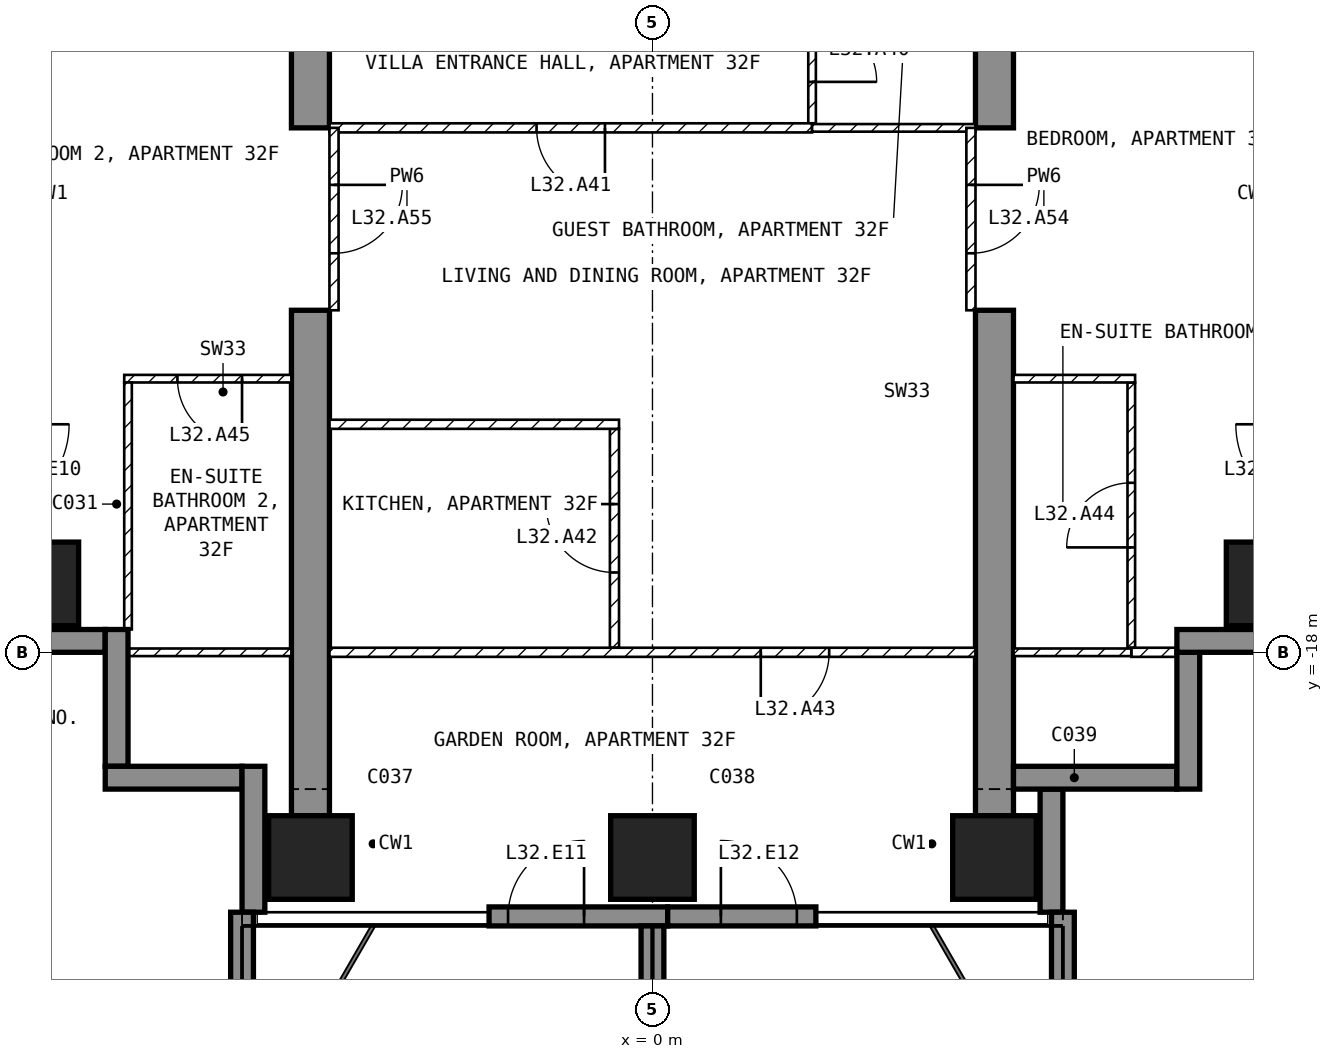
"""IFC4 building model, lengths in metres.
Left out: names, types, materials, properties, quantities, classifications, styles, units other than length and angle.
Written with IfcOpenShell. Run it as: python <this file> out.ifc"""

import sys

from ifc_helpers import new_model, si_unit, direction, frame, frame_2d, origin, origin_2d, place, context, subcontext, project, spatial, polyline, rectangle, outline, extrude, element, fill, save


model = new_model("IFC4")
c1 = context("Model", 3, precision=1e-05, world=origin(), true_north=direction((0.0, 1.0)))
c2 = subcontext(c1, "Body", "Model", "MODEL_VIEW")
j1 = project(units=[si_unit("LENGTHUNIT", "METRE"), si_unit("PLANEANGLEUNIT", "RADIAN")], contexts=[c1])
p1 = place(None, origin())
s1 = spatial("IfcSite", under=j1, at=p1, CompositionType="ELEMENT")
p2 = place(p1, origin())
s2 = spatial("IfcBuilding", under=s1, at=p2, CompositionType="ELEMENT")
p3 = place(p2, frame((0.0, 0.0, 133.9)))
s3 = spatial("IfcBuildingStorey", under=s2, at=p3, CompositionType="ELEMENT", Elevation=133.9)
for number, where, z_axis, x_axis in (
    (1, (-8.1, -17.1, -0.25), (0.0, 0.0, 1.0), (1.0, 0.0, 0.0)),
    (2, (-4.5, -20.7, -0.25), (0.0, 0.0, 1.0), (1.0, 0.0, 0.0)),
    (3, (0.0, -20.7, -0.25), (0.0, 0.0, 1.0), (1.0, 0.0, 0.0)),
    (4, (4.5, -20.7, -0.25), (0.0, 0.0, 1.0), (1.0, 0.0, 0.0)),
    (5, (8.1, -17.1, -0.25), (0.0, 0.0, 1.0), (1.0, 0.0, 0.0)),
):
    element("IfcColumn", number, at=place(p3, frame(where, z_axis=z_axis, x_axis=x_axis)), inside=s3, PredefinedType="COLUMN", context=c2, shape_type="SweptSolid", body=[
        extrude(rectangle(XDim=1.1, YDim=1.1, at=origin_2d()), origin(), (0.0, 0.0, 1.0), 3.5),
    ])
for number, where, z_axis, x_axis in (
    (6, (-4.75, -20.15, -0.25), (1.0, 0.0, 0.0), (0.0, 1.0, 0.0)),
    (7, (4.25, -20.15, -0.25), (1.0, 0.0, 0.0), (0.0, 1.0, 0.0)),
):
    element("IfcWall", number, at=place(p3, frame(where, z_axis=z_axis, x_axis=x_axis)), inside=s3, PredefinedType="SHEAR", context=c2, shape_type="SweptSolid", body=[
        extrude(outline(polyline([(0.0, 0.0), (6.65, 0.0), (6.65, 2.65), (9.05, 2.65), (9.05, 0.0), (11.15, 0.0), (11.15, 3.5), (0.0, 3.5), (0.0, 0.0)])), origin(), (0.0, 0.0, 1.0), 0.5),
    ])
p4 = place(p3, frame((-2.15, -21.475, 0.0), z_axis=(0.0, 0.0, 1.0), x_axis=(1.0, 0.0, 0.0)))
e8 = element("IfcWall", 8, at=p4, inside=s3, PredefinedType="SOLIDWALL", context=c2, shape_type="SweptSolid", body=[
    extrude(rectangle(XDim=2.35, YDim=0.25, at=frame_2d((1.175, 0.0))), origin(), (0.0, 0.0, 1.0), 3.25),
])
p5 = place(p4, frame((0.25, 0.0, 0.0)))
e9 = element("IfcOpeningElement", 9, at=p5, cuts=e8, PredefinedType="OPENING", context=c2, shape_type="SweptSolid", body=[
    extrude(rectangle(XDim=1.0, YDim=2.4, at=frame_2d((0.5, 1.2))), frame((0.0, 0.135, 0.0), z_axis=(0.0, -1.0, 0.0), x_axis=(1.0, 0.0, 0.0)), (0.0, 0.0, 1.0), 0.27),
])
p6 = place(p3, frame((0.2, -21.475, 0.0), z_axis=(0.0, 0.0, 1.0), x_axis=(1.0, 0.0, 0.0)))
e10 = element("IfcWall", 10, at=p6, inside=s3, PredefinedType="SOLIDWALL", context=c2, shape_type="SweptSolid", body=[
    extrude(rectangle(XDim=1.95, YDim=0.25, at=frame_2d((0.975, 0.0))), origin(), (0.0, 0.0, 1.0), 3.25),
])
p7 = place(p6, frame((0.7, 0.0, 0.0)))
e11 = element("IfcOpeningElement", 11, at=p7, cuts=e10, PredefinedType="OPENING", context=c2, shape_type="SweptSolid", body=[
    extrude(rectangle(XDim=1.0, YDim=2.4, at=frame_2d((0.5, 1.2))), frame((0.0, 0.135, 0.0), z_axis=(0.0, -1.0, 0.0), x_axis=(1.0, 0.0, 0.0)), (0.0, 0.0, 1.0), 0.27),
])
p8 = place(p3, frame((5.25, -21.42, 0.0), z_axis=(0.0, 0.0, 1.0), x_axis=(0.0, 1.0, 0.0)))
e12 = element("IfcWall", 12, at=p8, inside=s3, PredefinedType="SOLIDWALL", context=c2, shape_type="SweptSolid", body=[
    extrude(rectangle(XDim=1.62, YDim=0.3, at=frame_2d((0.81, 0.0))), origin(), (0.0, 0.0, 1.0), 3.25),
])
p9 = place(p3, frame((4.75, -19.65, 0.0), z_axis=(0.0, 0.0, 1.0), x_axis=(1.0, 0.0, 0.0)))
e13 = element("IfcWall", 13, at=p9, inside=s3, PredefinedType="SOLIDWALL", context=c2, shape_type="SweptSolid", body=[
    extrude(rectangle(XDim=2.15, YDim=0.3, at=frame_2d((1.075, 0.0))), origin(), (0.0, 0.0, 1.0), 3.25),
])
p10 = place(p3, frame((7.05, -19.8, 0.0), z_axis=(0.0, 0.0, 1.0), x_axis=(0.0, 1.0, 0.0)))
e14 = element("IfcWall", 14, at=p10, inside=s3, PredefinedType="SOLIDWALL", context=c2, shape_type="SweptSolid", body=[
    extrude(rectangle(XDim=1.8, YDim=0.3, at=frame_2d((0.9, 0.0))), origin(), (0.0, 0.0, 1.0), 3.25),
])
p11 = place(p3, frame((6.9, -17.85, 0.0), z_axis=(0.0, 0.0, 1.0), x_axis=(1.0, 0.0, 0.0)))
e15 = element("IfcWall", 15, at=p11, inside=s3, PredefinedType="SOLIDWALL", context=c2, shape_type="SweptSolid", body=[
    extrude(rectangle(XDim=1.85, YDim=0.3, at=frame_2d((0.925, 0.0))), origin(), (0.0, 0.0, 1.0), 3.25),
])
p12 = place(p3, frame((-8.75, -17.85, 0.0), z_axis=(0.0, 0.0, 1.0), x_axis=(1.0, 0.0, 0.0)))
e16 = element("IfcWall", 16, at=p12, inside=s3, PredefinedType="SOLIDWALL", context=c2, shape_type="SweptSolid", body=[
    extrude(rectangle(XDim=1.55, YDim=0.3, at=frame_2d((0.775, 0.0))), origin(), (0.0, 0.0, 1.0), 3.25),
])
for number, where, z_axis, x_axis in (
    (17, (-7.05, -17.7, 0.0), (0.0, 0.0, 1.0), (0.0, -1.0, 0.0)),
    (18, (-7.2, -19.65, 0.0), (0.0, 0.0, 1.0), (1.0, 0.0, 0.0)),
):
    element("IfcWall", number, at=place(p3, frame(where, z_axis=z_axis, x_axis=x_axis)), inside=s3, PredefinedType="SOLIDWALL", context=c2, shape_type="SweptSolid", body=[
        extrude(rectangle(XDim=1.8, YDim=0.3, at=frame_2d((0.9, 0.0))), origin(), (0.0, 0.0, 1.0), 3.25),
    ])
p13 = place(p3, frame((-5.25, -19.5, 0.0), z_axis=(0.0, 0.0, 1.0), x_axis=(0.0, -1.0, 0.0)))
e19 = element("IfcWall", 19, at=p13, inside=s3, PredefinedType="SOLIDWALL", context=c2, shape_type="SweptSolid", body=[
    extrude(rectangle(XDim=1.92, YDim=0.3, at=frame_2d((0.96, 0.0))), origin(), (0.0, 0.0, 1.0), 3.25),
])
p14 = place(p3, frame((-5.4, -21.42, 0.0), z_axis=(0.0, 0.0, 1.0), x_axis=(0.0, -1.0, 0.0)))
e20 = element("IfcWall", 20, at=p14, inside=s3, PredefinedType="SOLIDWALL", context=c2, shape_type="SweptSolid", body=[
    extrude(rectangle(XDim=2.88, YDim=0.3, at=frame_2d((1.44, 0.0))), origin(), (0.0, 0.0, 1.0), 3.25),
])
p15 = place(p3, frame((0.0, -21.6, 0.0), z_axis=(0.0, 0.0, 1.0), x_axis=(0.0, -1.0, 0.0)))
e21 = element("IfcWall", 21, at=p15, inside=s3, PredefinedType="SOLIDWALL", context=c2, shape_type="SweptSolid", body=[
    extrude(rectangle(XDim=2.7, YDim=0.3, at=frame_2d((1.35, 0.0))), origin(), (0.0, 0.0, 1.0), 3.25),
])
p16 = place(p3, frame((5.4, -21.42, 0.0), z_axis=(0.0, 0.0, 1.0), x_axis=(0.0, -1.0, 0.0)))
e22 = element("IfcWall", 22, at=p16, inside=s3, PredefinedType="SOLIDWALL", context=c2, shape_type="SweptSolid", body=[
    extrude(rectangle(XDim=2.88, YDim=0.3, at=frame_2d((1.44, 0.0))), origin(), (0.0, 0.0, 1.0), 3.25),
])
p17 = place(p3, frame((2.1, -9.1, 0.0), z_axis=(0.0, 0.0, 1.0), x_axis=(0.0, -1.0, 0.0)))
e23 = element("IfcWall", 23, at=p17, inside=s3, PredefinedType="PARTITIONING", context=c2, shape_type="SweptSolid", body=[
    extrude(rectangle(XDim=1.94, YDim=0.1, at=frame_2d((0.97, 0.0))), origin(), (0.0, 0.0, 1.0), 3.25),
])
p18 = place(p17, frame((0.545, 0.0, 0.0)))
e24 = element("IfcOpeningElement", 24, at=p18, cuts=e23, PredefinedType="OPENING", context=c2, shape_type="SweptSolid", body=[
    extrude(rectangle(XDim=0.85, YDim=2.1, at=frame_2d((0.425, 1.05))), frame((0.0, 0.06, 0.0), z_axis=(0.0, -1.0, 0.0), x_axis=(1.0, 0.0, 0.0)), (0.0, 0.0, 1.0), 0.12),
])
p19 = place(p3, frame((2.1, -11.1, 0.0), z_axis=(0.0, 0.0, 1.0), x_axis=(-1.0, 0.0, 0.0)))
e25 = element("IfcWall", 25, at=p19, inside=s3, PredefinedType="PARTITIONING", context=c2, shape_type="SweptSolid", body=[
    extrude(rectangle(XDim=6.35, YDim=0.12, at=frame_2d((3.175, 0.0))), origin(), (0.0, 0.0, 1.0), 3.25),
])
p20 = place(p19, frame((2.725, 0.0, 0.0)))
e26 = element("IfcOpeningElement", 26, at=p20, cuts=e25, PredefinedType="OPENING", context=c2, shape_type="SweptSolid", body=[
    extrude(rectangle(XDim=0.9, YDim=2.1, at=frame_2d((0.45, 1.05))), frame((0.0, 0.07, 0.0), z_axis=(0.0, -1.0, 0.0), x_axis=(1.0, 0.0, 0.0)), (0.0, 0.0, 1.0), 0.14),
])
p21 = place(p3, frame((4.25, -11.1, 0.0), z_axis=(0.0, 0.0, 1.0), x_axis=(-1.0, 0.0, 0.0)))
e27 = element("IfcWall", 27, at=p21, inside=s3, PredefinedType="PARTITIONING", context=c2, shape_type="SweptSolid", body=[
    extrude(rectangle(XDim=2.15, YDim=0.1, at=frame_2d((1.075, 0.0))), origin(), (0.0, 0.0, 1.0), 3.25),
])
p22 = place(p3, frame((-0.5, -17.94, 0.0), z_axis=(0.0, 0.0, 1.0), x_axis=(0.0, 1.0, 0.0)))
e28 = element("IfcWall", 28, at=p22, inside=s3, PredefinedType="PARTITIONING", context=c2, shape_type="SweptSolid", body=[
    extrude(rectangle(XDim=2.88, YDim=0.12, at=frame_2d((1.44, 0.0))), origin(), (0.0, 0.0, 1.0), 3.25),
])
p23 = place(p22, frame((0.99, 0.0, 0.0)))
e29 = element("IfcOpeningElement", 29, at=p23, cuts=e28, PredefinedType="OPENING", context=c2, shape_type="SweptSolid", body=[
    extrude(rectangle(XDim=0.9, YDim=2.1, at=frame_2d((0.45, 1.05))), frame((0.0, 0.07, 0.0), z_axis=(0.0, -1.0, 0.0), x_axis=(1.0, 0.0, 0.0)), (0.0, 0.0, 1.0), 0.14),
])
p24 = place(p3, frame((-0.44, -15.0, 0.0), z_axis=(0.0, 0.0, 1.0), x_axis=(-1.0, 0.0, 0.0)))
e30 = element("IfcWall", 30, at=p24, inside=s3, PredefinedType="PARTITIONING", context=c2, shape_type="SweptSolid", body=[
    extrude(rectangle(XDim=3.81, YDim=0.12, at=frame_2d((1.905, 0.0))), origin(), (0.0, 0.0, 1.0), 3.25),
])
p25 = place(p3, frame((4.25, -18.0, 0.0), z_axis=(0.0, 0.0, 1.0), x_axis=(-1.0, 0.0, 0.0)))
e31 = element("IfcWall", 31, at=p25, inside=s3, PredefinedType="PARTITIONING", context=c2, shape_type="SweptSolid", body=[
    extrude(rectangle(XDim=8.5, YDim=0.12, at=frame_2d((4.25, 0.0))), origin(), (0.0, 0.0, 1.0), 3.25),
])
p26 = place(p25, frame((1.925, 0.0, 0.0)))
e32 = element("IfcOpeningElement", 32, at=p26, cuts=e31, PredefinedType="OPENING", context=c2, shape_type="SweptSolid", body=[
    extrude(rectangle(XDim=0.9, YDim=2.1, at=frame_2d((0.45, 1.05))), frame((0.0, 0.07, 0.0), z_axis=(0.0, -1.0, 0.0), x_axis=(1.0, 0.0, 0.0)), (0.0, 0.0, 1.0), 0.14),
])
p27 = place(p3, frame((6.3, -17.94, 0.0), z_axis=(0.0, 0.0, 1.0), x_axis=(0.0, 1.0, 0.0)))
e33 = element("IfcWall", 33, at=p27, inside=s3, PredefinedType="PARTITIONING", context=c2, shape_type="SweptSolid", body=[
    extrude(rectangle(XDim=3.49, YDim=0.1, at=frame_2d((1.745, 0.0))), origin(), (0.0, 0.0, 1.0), 3.25),
])
p28 = place(p27, frame((1.32, 0.0, 0.0)))
e34 = element("IfcOpeningElement", 34, at=p28, cuts=e33, PredefinedType="OPENING", context=c2, shape_type="SweptSolid", body=[
    extrude(rectangle(XDim=0.85, YDim=2.1, at=frame_2d((0.425, 1.05))), frame((0.0, 0.06, 0.0), z_axis=(0.0, -1.0, 0.0), x_axis=(1.0, 0.0, 0.0)), (0.0, 0.0, 1.0), 0.12),
])
p29 = place(p3, frame((6.35, -14.4, 0.0), z_axis=(0.0, 0.0, 1.0), x_axis=(-1.0, 0.0, 0.0)))
e35 = element("IfcWall", 35, at=p29, inside=s3, PredefinedType="PARTITIONING", context=c2, shape_type="SweptSolid", body=[
    extrude(rectangle(XDim=1.6, YDim=0.1, at=frame_2d((0.8, 0.0))), origin(), (0.0, 0.0, 1.0), 3.25),
])
p30 = place(p3, frame((7.12, -18.0, 0.0), z_axis=(0.0, 0.0, 1.0), x_axis=(-1.0, 0.0, 0.0)))
e36 = element("IfcWall", 36, at=p30, inside=s3, PredefinedType="PARTITIONING", context=c2, shape_type="SweptSolid", body=[
    extrude(rectangle(XDim=0.82, YDim=0.12, at=frame_2d((0.41, 0.0))), origin(), (0.0, 0.0, 1.0), 3.25),
])
p31 = place(p3, frame((6.3, -18.0, 0.0), z_axis=(0.0, 0.0, 1.0), x_axis=(-1.0, 0.0, 0.0)))
e37 = element("IfcWall", 37, at=p31, inside=s3, PredefinedType="PARTITIONING", context=c2, shape_type="SweptSolid", body=[
    extrude(rectangle(XDim=1.55, YDim=0.1, at=frame_2d((0.775, 0.0))), origin(), (0.0, 0.0, 1.0), 3.25),
])
p32 = place(p3, frame((-4.75, -14.4, 0.0), z_axis=(0.0, 0.0, 1.0), x_axis=(-1.0, 0.0, 0.0)))
e38 = element("IfcWall", 38, at=p32, inside=s3, PredefinedType="PARTITIONING", context=c2, shape_type="SweptSolid", body=[
    extrude(rectangle(XDim=2.2, YDim=0.1, at=frame_2d((1.1, 0.0))), origin(), (0.0, 0.0, 1.0), 3.25),
])
p33 = place(p32, frame((0.65, 0.0, 0.0)))
e39 = element("IfcOpeningElement", 39, at=p33, cuts=e38, PredefinedType="OPENING", context=c2, shape_type="SweptSolid", body=[
    extrude(rectangle(XDim=0.85, YDim=2.1, at=frame_2d((0.425, 1.05))), frame((0.0, 0.06, 0.0), z_axis=(0.0, -1.0, 0.0), x_axis=(1.0, 0.0, 0.0)), (0.0, 0.0, 1.0), 0.12),
])
p34 = place(p3, frame((-6.9, -14.45, 0.0), z_axis=(0.0, 0.0, 1.0), x_axis=(0.0, -1.0, 0.0)))
e40 = element("IfcWall", 40, at=p34, inside=s3, PredefinedType="PARTITIONING", context=c2, shape_type="SweptSolid", body=[
    extrude(rectangle(XDim=3.25, YDim=0.1, at=frame_2d((1.625, 0.0))), origin(), (0.0, 0.0, 1.0), 3.25),
])
p35 = place(p3, frame((-4.75, -18.0, 0.0), z_axis=(0.0, 0.0, 1.0), x_axis=(-1.0, 0.0, 0.0)))
e41 = element("IfcWall", 41, at=p35, inside=s3, PredefinedType="PARTITIONING", context=c2, shape_type="SweptSolid", body=[
    extrude(rectangle(XDim=2.37, YDim=0.1, at=frame_2d((1.185, 0.0))), origin(), (0.0, 0.0, 1.0), 3.25),
])
p36 = place(p3, frame((4.19, -11.1, 0.0), z_axis=(0.0, 0.0, 1.0), x_axis=(0.0, -1.0, 0.0)))
e42 = element("IfcWall", 42, at=p36, inside=s3, PredefinedType="PARTITIONING", context=c2, shape_type="SweptSolid", body=[
    extrude(rectangle(XDim=2.4, YDim=0.12, at=frame_2d((1.2, 0.0))), origin(), (0.0, 0.0, 1.0), 2.4),
])
p37 = place(p36, frame((0.75, 0.0, 0.0)))
e43 = element("IfcOpeningElement", 43, at=p37, cuts=e42, PredefinedType="OPENING", context=c2, shape_type="SweptSolid", body=[
    extrude(rectangle(XDim=0.9, YDim=2.1, at=frame_2d((0.45, 1.05))), frame((0.0, 0.07, 0.0), z_axis=(0.0, -1.0, 0.0), x_axis=(1.0, 0.0, 0.0)), (0.0, 0.0, 1.0), 0.14),
])
p38 = place(p3, frame((-4.19, -11.1, 0.0), z_axis=(0.0, 0.0, 1.0), x_axis=(0.0, -1.0, 0.0)))
e44 = element("IfcWall", 44, at=p38, inside=s3, PredefinedType="PARTITIONING", context=c2, shape_type="SweptSolid", body=[
    extrude(rectangle(XDim=2.4, YDim=0.12, at=frame_2d((1.2, 0.0))), origin(), (0.0, 0.0, 1.0), 2.4),
])
p39 = place(p38, frame((0.75, 0.0, 0.0)))
e45 = element("IfcOpeningElement", 45, at=p39, cuts=e44, PredefinedType="OPENING", context=c2, shape_type="SweptSolid", body=[
    extrude(rectangle(XDim=0.9, YDim=2.1, at=frame_2d((0.45, 1.05))), frame((0.0, 0.07, 0.0), z_axis=(0.0, -1.0, 0.0), x_axis=(1.0, 0.0, 0.0)), (0.0, 0.0, 1.0), 0.14),
])
p40 = place(p5, origin())
e46 = element("IfcDoor", 46, at=p40, inside=s3, OperationType="SINGLE_SWING_RIGHT", PredefinedType="DOOR", context=c2, shape_type="SweptSolid", body=[
    extrude(rectangle(XDim=1.0, YDim=2.4, at=frame_2d((0.5, 1.2))), frame((0.0, 0.025, 0.0), z_axis=(0.0, -1.0, 0.0), x_axis=(1.0, 0.0, 0.0)), (0.0, 0.0, 1.0), 0.05),
])
fill(e9, e46)
p41 = place(p7, origin())
e47 = element("IfcDoor", 47, at=p41, inside=s3, OperationType="SINGLE_SWING_LEFT", PredefinedType="DOOR", context=c2, shape_type="SweptSolid", body=[
    extrude(rectangle(XDim=1.0, YDim=2.4, at=frame_2d((0.5, 1.2))), frame((0.0, 0.025, 0.0), z_axis=(0.0, -1.0, 0.0), x_axis=(1.0, 0.0, 0.0)), (0.0, 0.0, 1.0), 0.05),
])
fill(e11, e47)
p42 = place(p18, origin())
e48 = element("IfcDoor", 48, at=p42, inside=s3, OperationType="SINGLE_SWING_RIGHT", PredefinedType="DOOR", context=c2, shape_type="SweptSolid", body=[
    extrude(rectangle(XDim=0.85, YDim=2.1, at=frame_2d((0.425, 1.05))), frame((0.0, 0.025, 0.0), z_axis=(0.0, -1.0, 0.0), x_axis=(1.0, 0.0, 0.0)), (0.0, 0.0, 1.0), 0.05),
])
fill(e24, e48)
p43 = place(p20, origin())
e49 = element("IfcDoor", 49, at=p43, inside=s3, OperationType="SINGLE_SWING_LEFT", PredefinedType="DOOR", context=c2, shape_type="SweptSolid", body=[
    extrude(rectangle(XDim=0.9, YDim=2.1, at=frame_2d((0.45, 1.05))), frame((0.0, 0.025, 0.0), z_axis=(0.0, -1.0, 0.0), x_axis=(1.0, 0.0, 0.0)), (0.0, 0.0, 1.0), 0.05),
])
fill(e26, e49)
p44 = place(p23, origin())
e50 = element("IfcDoor", 50, at=p44, inside=s3, OperationType="SINGLE_SWING_RIGHT", PredefinedType="DOOR", context=c2, shape_type="SweptSolid", body=[
    extrude(rectangle(XDim=0.9, YDim=2.1, at=frame_2d((0.45, 1.05))), frame((0.0, 0.025, 0.0), z_axis=(0.0, -1.0, 0.0), x_axis=(1.0, 0.0, 0.0)), (0.0, 0.0, 1.0), 0.05),
])
fill(e29, e50)
p45 = place(p26, origin())
e51 = element("IfcDoor", 51, at=p45, inside=s3, OperationType="SINGLE_SWING_RIGHT", PredefinedType="DOOR", context=c2, shape_type="SweptSolid", body=[
    extrude(rectangle(XDim=0.9, YDim=2.1, at=frame_2d((0.45, 1.05))), frame((0.0, 0.025, 0.0), z_axis=(0.0, -1.0, 0.0), x_axis=(1.0, 0.0, 0.0)), (0.0, 0.0, 1.0), 0.05),
])
fill(e32, e51)
p46 = place(p28, origin())
e52 = element("IfcDoor", 52, at=p46, inside=s3, OperationType="SINGLE_SWING_LEFT", PredefinedType="DOOR", context=c2, shape_type="SweptSolid", body=[
    extrude(rectangle(XDim=0.85, YDim=2.1, at=frame_2d((0.425, 1.05))), frame((0.0, 0.025, 0.0), z_axis=(0.0, -1.0, 0.0), x_axis=(1.0, 0.0, 0.0)), (0.0, 0.0, 1.0), 0.05),
])
fill(e34, e52)
p47 = place(p33, origin())
e53 = element("IfcDoor", 53, at=p47, inside=s3, OperationType="SINGLE_SWING_LEFT", PredefinedType="DOOR", context=c2, shape_type="SweptSolid", body=[
    extrude(rectangle(XDim=0.85, YDim=2.1, at=frame_2d((0.425, 1.05))), frame((0.0, 0.025, 0.0), z_axis=(0.0, -1.0, 0.0), x_axis=(1.0, 0.0, 0.0)), (0.0, 0.0, 1.0), 0.05),
])
fill(e39, e53)
p48 = place(p37, origin())
e54 = element("IfcDoor", 54, at=p48, inside=s3, OperationType="SINGLE_SWING_LEFT", PredefinedType="DOOR", context=c2, shape_type="SweptSolid", body=[
    extrude(rectangle(XDim=0.9, YDim=2.1, at=frame_2d((0.45, 1.05))), frame((0.0, 0.025, 0.0), z_axis=(0.0, -1.0, 0.0), x_axis=(1.0, 0.0, 0.0)), (0.0, 0.0, 1.0), 0.05),
])
fill(e43, e54)
p49 = place(p39, origin())
e55 = element("IfcDoor", 55, at=p49, inside=s3, OperationType="SINGLE_SWING_LEFT", PredefinedType="DOOR", context=c2, shape_type="SweptSolid", body=[
    extrude(rectangle(XDim=0.9, YDim=2.1, at=frame_2d((0.45, 1.05))), frame((0.0, 0.025, 0.0), z_axis=(0.0, -1.0, 0.0), x_axis=(1.0, 0.0, 0.0)), (0.0, 0.0, 1.0), 0.05),
])
fill(e45, e55)
save(model, sys.argv[1])
